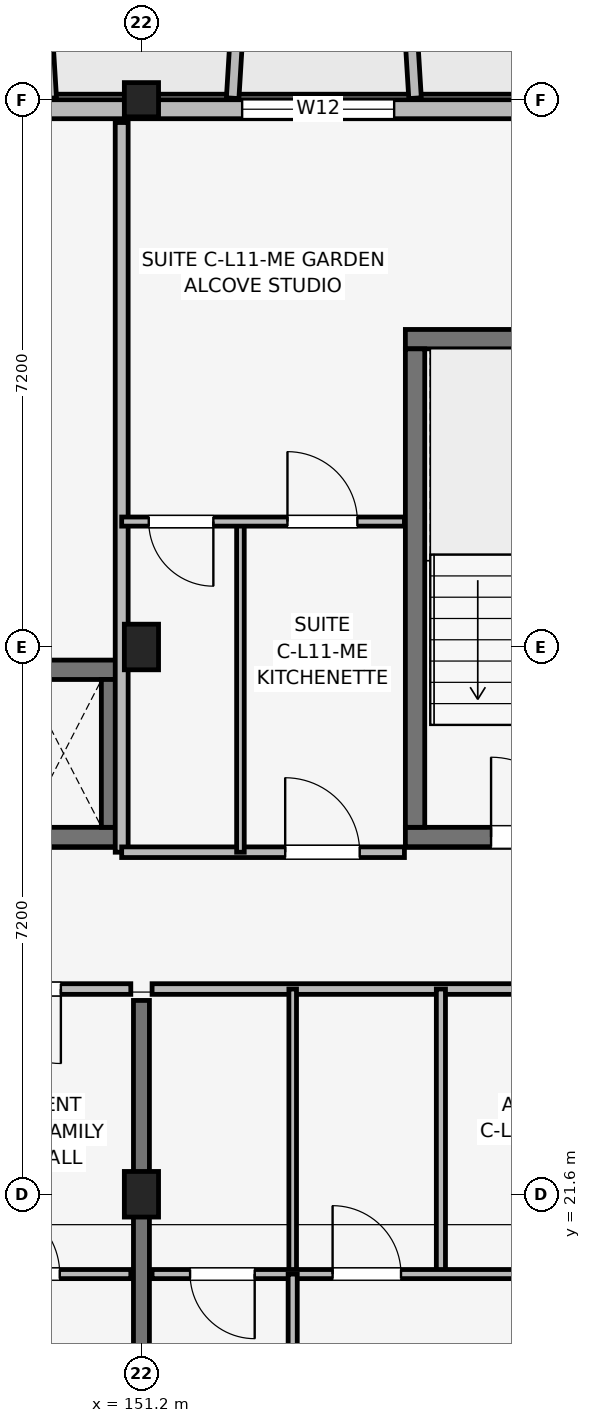
"""IFC4 building model, lengths in metres.
Left out: names, types, materials, properties, quantities, classifications, styles, units other than length and angle.
Written with IfcOpenShell. Run it as: python <this file> out.ifc"""

import sys

from ifc_helpers import new_model, si_unit, direction, frame, frame_2d, origin, origin_2d, place, context, subcontext, project, spatial, rectangle, extrude, element, fill, save


model = new_model("IFC4")
c1 = context("Model", 3, precision=1e-05, world=origin(), true_north=direction((0.0, 1.0)))
c2 = subcontext(c1, "Body", "Model", "MODEL_VIEW")
j1 = project(units=[si_unit("LENGTHUNIT", "METRE"), si_unit("PLANEANGLEUNIT", "RADIAN")], contexts=[c1])
p1 = place(None, origin())
s1 = spatial("IfcSite", under=j1, at=p1, CompositionType="ELEMENT")
p2 = place(p1, origin())
s2 = spatial("IfcBuilding", under=s1, at=p2, CompositionType="ELEMENT")
p3 = place(p2, frame((0.0, 0.0, 37.05)))
s3 = spatial("IfcBuildingStorey", under=s2, at=p3, CompositionType="ELEMENT", Elevation=37.05)
for number, where, z_axis, x_axis in (
    (1, (151.2, 21.6, 0.0), (0.0, 0.0, 1.0), (1.0, 0.0, 0.0)),
    (2, (151.2, 28.8, 0.0), (0.0, 0.0, 1.0), (1.0, 0.0, 0.0)),
):
    element("IfcColumn", number, at=place(p3, frame(where, z_axis=z_axis, x_axis=x_axis)), inside=s3, PredefinedType="COLUMN", context=c2, shape_type="SweptSolid", body=[
        extrude(rectangle(XDim=0.45, YDim=0.6, at=origin_2d()), origin(), (0.0, 0.0, 1.0), 3.15),
    ])
p4 = place(p3, frame((151.2, 36.0, 0.0), z_axis=(0.0, 0.0, 1.0), x_axis=(1.0, 0.0, 0.0)))
e3 = element("IfcColumn", 3, at=p4, inside=s3, PredefinedType="COLUMN", context=c2, shape_type="SweptSolid", body=[
    extrude(rectangle(XDim=0.45, YDim=0.45, at=origin_2d()), origin(), (0.0, 0.0, 1.0), 3.15),
])
p5 = place(p3, frame((154.673, 26.3, 0.0), z_axis=(0.0, 0.0, 1.0), x_axis=(1.0, 0.0, 0.0)))
e4 = element("IfcWall", 4, at=p5, inside=s3, PredefinedType="SHEAR", context=c2, shape_type="SweptSolid", body=[
    extrude(rectangle(XDim=3.305, YDim=0.255, at=frame_2d((1.652, 0.0))), origin(), (0.0, 0.0, 1.0), 3.15),
])
p6 = place(p5, frame((1.127, 0.0, 0.0)))
e5 = element("IfcOpeningElement", 5, at=p6, cuts=e4, PredefinedType="OPENING", context=c2, shape_type="SweptSolid", body=[
    extrude(rectangle(XDim=1.05, YDim=2.12, at=frame_2d((0.525, 1.06))), frame((0.0, 0.137, 0.0), z_axis=(0.0, -1.0, 0.0), x_axis=(1.0, 0.0, 0.0)), (0.0, 0.0, 1.0), 0.275),
])
p7 = place(p3, frame((154.673, 32.85, 0.0), z_axis=(0.0, 0.0, 1.0), x_axis=(1.0, 0.0, 0.0)))
e6 = element("IfcWall", 6, at=p7, inside=s3, PredefinedType="SHEAR", context=c2, shape_type="SweptSolid", body=[
    extrude(rectangle(XDim=3.305, YDim=0.255, at=frame_2d((1.652, 0.0))), origin(), (0.0, 0.0, 1.0), 3.15),
])
p8 = place(p3, frame((154.8, 26.427, 0.0), z_axis=(0.0, 0.0, 1.0), x_axis=(0.0, 1.0, 0.0)))
e7 = element("IfcWall", 7, at=p8, inside=s3, PredefinedType="SHEAR", context=c2, shape_type="SweptSolid", body=[
    extrude(rectangle(XDim=6.295, YDim=0.255, at=frame_2d((3.147, 0.0))), origin(), (0.0, 0.0, 1.0), 3.15),
])
for number, where, z_axis, x_axis in (
    (8, (149.123, 26.3, 0.0), (0.0, 0.0, 1.0), (1.0, 0.0, 0.0)),
    (9, (149.123, 28.5, 0.0), (0.0, 0.0, 1.0), (1.0, 0.0, 0.0)),
):
    element("IfcWall", number, at=place(p3, frame(where, z_axis=z_axis, x_axis=x_axis)), inside=s3, PredefinedType="SHEAR", context=c2, shape_type="SweptSolid", body=[
        extrude(rectangle(XDim=1.805, YDim=0.255, at=frame_2d((0.902, 0.0))), origin(), (0.0, 0.0, 1.0), 3.15),
    ])
p9 = place(p3, frame((150.8, 26.427, 0.0), z_axis=(0.0, 0.0, 1.0), x_axis=(0.0, 1.0, 0.0)))
e10 = element("IfcWall", 10, at=p9, inside=s3, PredefinedType="SHEAR", context=c2, shape_type="SweptSolid", body=[
    extrude(rectangle(XDim=1.945, YDim=0.255, at=frame_2d((0.973, 0.0))), origin(), (0.0, 0.0, 1.0), 3.15),
])
p10 = place(p3, frame((151.2, 14.75, 0.0), z_axis=(0.0, 0.0, 1.0), x_axis=(0.0, 1.0, 0.0)))
e11 = element("IfcWall", 11, at=p10, inside=s3, PredefinedType="SHEAR", context=c2, shape_type="SweptSolid", body=[
    extrude(rectangle(XDim=9.4, YDim=0.21, at=frame_2d((4.7, 0.0))), origin(), (0.0, 0.0, 1.0), 3.15),
])
p11 = place(p3, frame((162.6, 35.875, 0.0), z_axis=(0.0, 0.0, 1.0), x_axis=(-1.0, 0.0, 0.0)))
e12 = element("IfcWall", 12, at=p11, inside=s3, PredefinedType="SOLIDWALL", context=c2, shape_type="SweptSolid", body=[
    extrude(rectangle(XDim=30.0, YDim=0.25, at=frame_2d((15.0, 0.0))), origin(), (0.0, 0.0, 1.0), 2.45),
])
p12 = place(p11, frame((28.95, 0.0, 0.0), z_axis=(0.0, 0.0, 1.0), x_axis=(-1.0, 0.0, 0.0)))
e13 = element("IfcOpeningElement", 13, at=p12, cuts=e12, PredefinedType="OPENING", context=c2, shape_type="SweptSolid", body=[
    extrude(rectangle(XDim=1.5, YDim=2.15, at=frame_2d((0.75, 1.075))), frame((0.0, 0.135, 0.0), z_axis=(0.0, -1.0, 0.0), x_axis=(1.0, 0.0, 0.0)), (0.0, 0.0, 1.0), 0.27),
])
p13 = place(p11, frame((2.625, 0.0, 0.0), z_axis=(0.0, 0.0, 1.0), x_axis=(-1.0, 0.0, 0.0)))
e14 = element("IfcOpeningElement", 14, at=p13, cuts=e12, PredefinedType="OPENING", context=c2, shape_type="SweptSolid", body=[
    extrude(rectangle(XDim=1.65, YDim=2.15, at=frame_2d((0.825, 1.075))), frame((0.0, 0.135, 0.0), z_axis=(0.0, -1.0, 0.0), x_axis=(1.0, 0.0, 0.0)), (0.0, 0.0, 1.0), 0.27),
])
p14 = place(p11, frame((15.23, 0.0, 0.5)))
e15 = element("IfcOpeningElement", 15, at=p14, cuts=e12, PredefinedType="OPENING", context=c2, shape_type="SweptSolid", body=[
    extrude(rectangle(XDim=1.15, YDim=1.68, at=frame_2d((0.575, 0.84))), frame((0.0, 0.135, 0.0), z_axis=(0.0, -1.0, 0.0), x_axis=(1.0, 0.0, 0.0)), (0.0, 0.0, 1.0), 0.27),
])
p15 = place(p11, frame((8.075, 0.0, 0.69)))
e16 = element("IfcOpeningElement", 16, at=p15, cuts=e12, PredefinedType="OPENING", context=c2, shape_type="SweptSolid", body=[
    extrude(rectangle(XDim=2.0, YDim=1.65, at=frame_2d((1.0, 0.825))), frame((0.0, 0.135, 0.0), z_axis=(0.0, -1.0, 0.0), x_axis=(1.0, 0.0, 0.0)), (0.0, 0.0, 1.0), 0.27),
])
p16 = place(p11, frame((20.11, 0.0, 0.7)))
e17 = element("IfcOpeningElement", 17, at=p16, cuts=e12, PredefinedType="OPENING", context=c2, shape_type="SweptSolid", body=[
    extrude(rectangle(XDim=1.58, YDim=1.6, at=frame_2d((0.79, 0.8))), frame((0.0, 0.135, 0.0), z_axis=(0.0, -1.0, 0.0), x_axis=(1.0, 0.0, 0.0)), (0.0, 0.0, 1.0), 0.27),
])
p17 = place(p3, frame((150.0, 36.02, 0.0), z_axis=(0.0, 0.0, 1.0), x_axis=(-0.061170732449, 0.998127317276, 0.0)))
e18 = element("IfcWall", 18, at=p17, inside=s3, PredefinedType="ELEMENTEDWALL", context=c2, shape_type="SweptSolid", body=[
    extrude(rectangle(XDim=1.964, YDim=0.165, at=frame_2d((0.982, 0.0))), origin(), (0.0, 0.0, 1.0), 2.45),
])
for number, where, z_axis, x_axis in (
    (19, (152.4, 36.02, 0.0), (0.0, 0.0, 1.0), (0.061, 0.998, 0.0)),
    (20, (154.8, 36.02, 0.0), (0.0, 0.0, 1.0), (-0.061, 0.998, 0.0)),
):
    element("IfcWall", number, at=place(p3, frame(where, z_axis=z_axis, x_axis=x_axis)), inside=s3, PredefinedType="ELEMENTEDWALL", context=c2, shape_type="SweptSolid", body=[
        extrude(rectangle(XDim=1.964, YDim=0.165, at=frame_2d((0.982, 0.0))), origin(), (0.0, 0.0, 1.0), 2.53),
    ])
p18 = place(p3, frame((144.14, 24.3, 0.0), z_axis=(0.0, 0.0, 1.0), x_axis=(1.0, 0.0, 0.0)))
e21 = element("IfcWall", 21, at=p18, inside=s3, PredefinedType="PARTITIONING", context=c2, shape_type="SweptSolid", body=[
    extrude(rectangle(XDim=6.92, YDim=0.14, at=frame_2d((3.46, 0.0))), origin(), (0.0, 0.0, 1.0), 2.38),
])
p19 = place(p18, frame((6.0, 0.0, 0.0), z_axis=(0.0, 0.0, 1.0), x_axis=(-1.0, 0.0, 0.0)))
e22 = element("IfcOpeningElement", 22, at=p19, cuts=e21, PredefinedType="OPENING", context=c2, shape_type="SweptSolid", body=[
    extrude(rectangle(XDim=0.98, YDim=2.1, at=frame_2d((0.49, 1.05))), frame((0.0, 0.08, 0.0), z_axis=(0.0, -1.0, 0.0), x_axis=(1.0, 0.0, 0.0)), (0.0, 0.0, 1.0), 0.16),
])
p20 = place(p3, frame((144.14, 20.55, 0.0), z_axis=(0.0, 0.0, 1.0), x_axis=(1.0, 0.0, 0.0)))
e23 = element("IfcWall", 23, at=p20, inside=s3, PredefinedType="PARTITIONING", context=c2, shape_type="SweptSolid", body=[
    extrude(rectangle(XDim=6.92, YDim=0.12, at=frame_2d((3.46, 0.0))), origin(), (0.0, 0.0, 1.0), 2.38),
])
p21 = place(p20, frame((0.5, 0.0, 0.0)))
e24 = element("IfcOpeningElement", 24, at=p21, cuts=e23, PredefinedType="OPENING", context=c2, shape_type="SweptSolid", body=[
    extrude(rectangle(XDim=0.85, YDim=2.08, at=frame_2d((0.425, 1.04))), frame((0.0, 0.07, 0.0), z_axis=(0.0, -1.0, 0.0), x_axis=(1.0, 0.0, 0.0)), (0.0, 0.0, 1.0), 0.14),
])
p22 = place(p20, frame((3.425, 0.0, 0.0), z_axis=(0.0, 0.0, 1.0), x_axis=(-1.0, 0.0, 0.0)))
e25 = element("IfcOpeningElement", 25, at=p22, cuts=e23, PredefinedType="OPENING", context=c2, shape_type="SweptSolid", body=[
    extrude(rectangle(XDim=0.9, YDim=2.08, at=frame_2d((0.45, 1.04))), frame((0.0, 0.07, 0.0), z_axis=(0.0, -1.0, 0.0), x_axis=(1.0, 0.0, 0.0)), (0.0, 0.0, 1.0), 0.14),
])
p23 = place(p20, frame((5.035, 0.0, 0.0)))
e26 = element("IfcOpeningElement", 26, at=p23, cuts=e23, PredefinedType="OPENING", context=c2, shape_type="SweptSolid", body=[
    extrude(rectangle(XDim=0.95, YDim=2.08, at=frame_2d((0.475, 1.04))), frame((0.0, 0.07, 0.0), z_axis=(0.0, -1.0, 0.0), x_axis=(1.0, 0.0, 0.0)), (0.0, 0.0, 1.0), 0.14),
])
p24 = place(p3, frame((151.34, 24.3, 0.0), z_axis=(0.0, 0.0, 1.0), x_axis=(1.0, 0.0, 0.0)))
e27 = element("IfcWall", 27, at=p24, inside=s3, PredefinedType="PARTITIONING", context=c2, shape_type="SweptSolid", body=[
    extrude(rectangle(XDim=6.92, YDim=0.14, at=frame_2d((3.46, 0.0))), origin(), (0.0, 0.0, 1.0), 2.38),
])
p25 = place(p24, frame((4.87, 0.0, 0.0)))
e28 = element("IfcOpeningElement", 28, at=p25, cuts=e27, PredefinedType="OPENING", context=c2, shape_type="SweptSolid", body=[
    extrude(rectangle(XDim=0.98, YDim=2.1, at=frame_2d((0.49, 1.05))), frame((0.0, 0.08, 0.0), z_axis=(0.0, -1.0, 0.0), x_axis=(1.0, 0.0, 0.0)), (0.0, 0.0, 1.0), 0.16),
])
p26 = place(p3, frame((153.19, 20.55, 0.0), z_axis=(0.0, 0.0, 1.0), x_axis=(0.0, 1.0, 0.0)))
e29 = element("IfcWall", 29, at=p26, inside=s3, PredefinedType="PARTITIONING", context=c2, shape_type="SweptSolid", body=[
    extrude(rectangle(XDim=3.75, YDim=0.1, at=frame_2d((1.875, 0.0))), origin(), (0.0, 0.0, 1.0), 2.38),
])
p27 = place(p3, frame((155.14, 20.55, 0.0), z_axis=(0.0, 0.0, 1.0), x_axis=(0.0, 1.0, 0.0)))
e30 = element("IfcWall", 30, at=p27, inside=s3, PredefinedType="PARTITIONING", context=c2, shape_type="SweptSolid", body=[
    extrude(rectangle(XDim=3.75, YDim=0.12, at=frame_2d((1.875, 0.0))), origin(), (0.0, 0.0, 1.0), 2.38),
])
p28 = place(p3, frame((151.34, 20.55, 0.0), z_axis=(0.0, 0.0, 1.0), x_axis=(1.0, 0.0, 0.0)))
e31 = element("IfcWall", 31, at=p28, inside=s3, PredefinedType="PARTITIONING", context=c2, shape_type="SweptSolid", body=[
    extrude(rectangle(XDim=6.92, YDim=0.12, at=frame_2d((3.46, 0.0))), origin(), (0.0, 0.0, 1.0), 2.38),
])
p29 = place(p28, frame((1.35, 0.0, 0.0), z_axis=(0.0, 0.0, 1.0), x_axis=(-1.0, 0.0, 0.0)))
e32 = element("IfcOpeningElement", 32, at=p29, cuts=e31, PredefinedType="OPENING", context=c2, shape_type="SweptSolid", body=[
    extrude(rectangle(XDim=0.85, YDim=2.08, at=frame_2d((0.425, 1.04))), frame((0.0, 0.07, 0.0), z_axis=(0.0, -1.0, 0.0), x_axis=(1.0, 0.0, 0.0)), (0.0, 0.0, 1.0), 0.14),
])
p30 = place(p28, frame((2.375, 0.0, 0.0)))
e33 = element("IfcOpeningElement", 33, at=p30, cuts=e31, PredefinedType="OPENING", context=c2, shape_type="SweptSolid", body=[
    extrude(rectangle(XDim=0.9, YDim=2.08, at=frame_2d((0.45, 1.04))), frame((0.0, 0.07, 0.0), z_axis=(0.0, -1.0, 0.0), x_axis=(1.0, 0.0, 0.0)), (0.0, 0.0, 1.0), 0.14),
])
p31 = place(p28, frame((5.835, 0.0, 0.0), z_axis=(0.0, 0.0, 1.0), x_axis=(-1.0, 0.0, 0.0)))
e34 = element("IfcOpeningElement", 34, at=p31, cuts=e31, PredefinedType="OPENING", context=c2, shape_type="SweptSolid", body=[
    extrude(rectangle(XDim=0.95, YDim=2.08, at=frame_2d((0.475, 1.04))), frame((0.0, 0.07, 0.0), z_axis=(0.0, -1.0, 0.0), x_axis=(1.0, 0.0, 0.0)), (0.0, 0.0, 1.0), 0.14),
])
p32 = place(p3, frame((153.19, 14.7, 0.0), z_axis=(0.0, 0.0, 1.0), x_axis=(0.0, 1.0, 0.0)))
e35 = element("IfcWall", 35, at=p32, inside=s3, PredefinedType="PARTITIONING", context=c2, shape_type="SweptSolid", body=[
    extrude(rectangle(XDim=5.85, YDim=0.12, at=frame_2d((2.925, 0.0))), origin(), (0.0, 0.0, 1.0), 2.38),
])
p33 = place(p32, frame((2.475, 0.0, 0.0)))
e36 = element("IfcOpeningElement", 36, at=p33, cuts=e35, PredefinedType="OPENING", context=c2, shape_type="SweptSolid", body=[
    extrude(rectangle(XDim=0.9, YDim=2.08, at=frame_2d((0.45, 1.04))), frame((0.0, 0.07, 0.0), z_axis=(0.0, -1.0, 0.0), x_axis=(1.0, 0.0, 0.0)), (0.0, 0.0, 1.0), 0.14),
])
p34 = place(p3, frame((150.94, 26.1, 0.0), z_axis=(0.0, 0.0, 1.0), x_axis=(0.0, 1.0, 0.0)))
e37 = element("IfcWall", 37, at=p34, inside=s3, PredefinedType="PARTITIONING", context=c2, shape_type="SweptSolid", body=[
    extrude(rectangle(XDim=9.6, YDim=0.17, at=frame_2d((4.8, 0.0))), origin(), (0.0, 0.0, 1.0), 2.38),
])
p35 = place(p3, frame((150.94, 26.1, 0.0), z_axis=(0.0, 0.0, 1.0), x_axis=(1.0, 0.0, 0.0)))
e38 = element("IfcWall", 38, at=p35, inside=s3, PredefinedType="PARTITIONING", context=c2, shape_type="SweptSolid", body=[
    extrude(rectangle(XDim=3.72, YDim=0.14, at=frame_2d((1.86, 0.0))), origin(), (0.0, 0.0, 1.0), 2.38),
])
p36 = place(p35, frame((2.151, 0.0, 0.0)))
e39 = element("IfcOpeningElement", 39, at=p36, cuts=e38, PredefinedType="OPENING", context=c2, shape_type="SweptSolid", body=[
    extrude(rectangle(XDim=0.98, YDim=2.1, at=frame_2d((0.49, 1.05))), frame((0.0, 0.08, 0.0), z_axis=(0.0, -1.0, 0.0), x_axis=(1.0, 0.0, 0.0)), (0.0, 0.0, 1.0), 0.16),
])
p37 = place(p3, frame((152.502, 26.1, 0.0), z_axis=(0.0, 0.0, 1.0), x_axis=(0.0, 1.0, 0.0)))
e40 = element("IfcWall", 40, at=p37, inside=s3, PredefinedType="PARTITIONING", context=c2, shape_type="SweptSolid", body=[
    extrude(rectangle(XDim=4.35, YDim=0.1, at=frame_2d((2.175, 0.0))), origin(), (0.0, 0.0, 1.0), 2.38),
])
p38 = place(p3, frame((150.94, 30.45, 0.0), z_axis=(0.0, 0.0, 1.0), x_axis=(1.0, 0.0, 0.0)))
e41 = element("IfcWall", 41, at=p38, inside=s3, PredefinedType="PARTITIONING", context=c2, shape_type="SweptSolid", body=[
    extrude(rectangle(XDim=3.72, YDim=0.12, at=frame_2d((1.86, 0.0))), origin(), (0.0, 0.0, 1.0), 2.38),
])
p39 = place(p38, frame((1.206, 0.0, 0.0), z_axis=(0.0, 0.0, 1.0), x_axis=(-1.0, 0.0, 0.0)))
e42 = element("IfcOpeningElement", 42, at=p39, cuts=e41, PredefinedType="OPENING", context=c2, shape_type="SweptSolid", body=[
    extrude(rectangle(XDim=0.85, YDim=2.08, at=frame_2d((0.425, 1.04))), frame((0.0, 0.07, 0.0), z_axis=(0.0, -1.0, 0.0), x_axis=(1.0, 0.0, 0.0)), (0.0, 0.0, 1.0), 0.14),
])
p40 = place(p38, frame((2.181, 0.0, 0.0)))
e43 = element("IfcOpeningElement", 43, at=p40, cuts=e41, PredefinedType="OPENING", context=c2, shape_type="SweptSolid", body=[
    extrude(rectangle(XDim=0.92, YDim=2.08, at=frame_2d((0.46, 1.04))), frame((0.0, 0.07, 0.0), z_axis=(0.0, -1.0, 0.0), x_axis=(1.0, 0.0, 0.0)), (0.0, 0.0, 1.0), 0.14),
])
p41 = place(p15, origin())
e44 = element("IfcWindow", 44, at=p41, inside=s3, PartitioningType="SINGLE_PANEL", PredefinedType="WINDOW", context=c2, shape_type="SweptSolid", body=[
    extrude(rectangle(XDim=2.0, YDim=1.65, at=frame_2d((1.0, 0.825))), frame((0.0, 0.03, 0.0), z_axis=(0.0, -1.0, 0.0), x_axis=(1.0, 0.0, 0.0)), (0.0, 0.0, 1.0), 0.06),
])
fill(e16, e44)
p42 = place(p19, origin())
e45 = element("IfcDoor", 45, at=p42, inside=s3, OperationType="SINGLE_SWING_RIGHT", PredefinedType="DOOR", context=c2, shape_type="SweptSolid", body=[
    extrude(rectangle(XDim=0.98, YDim=2.1, at=frame_2d((0.49, 1.05))), frame((0.0, 0.025, 0.0), z_axis=(0.0, -1.0, 0.0), x_axis=(1.0, 0.0, 0.0)), (0.0, 0.0, 1.0), 0.05),
])
fill(e22, e45)
p43 = place(p23, origin())
e46 = element("IfcDoor", 46, at=p43, inside=s3, OperationType="SINGLE_SWING_LEFT", PredefinedType="DOOR", context=c2, shape_type="SweptSolid", body=[
    extrude(rectangle(XDim=0.95, YDim=2.08, at=frame_2d((0.475, 1.04))), frame((0.0, 0.025, 0.0), z_axis=(0.0, -1.0, 0.0), x_axis=(1.0, 0.0, 0.0)), (0.0, 0.0, 1.0), 0.05),
])
fill(e26, e46)
p44 = place(p29, origin())
e47 = element("IfcDoor", 47, at=p44, inside=s3, OperationType="SINGLE_SWING_RIGHT", PredefinedType="DOOR", context=c2, shape_type="SweptSolid", body=[
    extrude(rectangle(XDim=0.85, YDim=2.08, at=frame_2d((0.425, 1.04))), frame((0.0, 0.025, 0.0), z_axis=(0.0, -1.0, 0.0), x_axis=(1.0, 0.0, 0.0)), (0.0, 0.0, 1.0), 0.05),
])
fill(e32, e47)
p45 = place(p30, origin())
e48 = element("IfcDoor", 48, at=p45, inside=s3, OperationType="SINGLE_SWING_LEFT", PredefinedType="DOOR", context=c2, shape_type="SweptSolid", body=[
    extrude(rectangle(XDim=0.9, YDim=2.08, at=frame_2d((0.45, 1.04))), frame((0.0, 0.025, 0.0), z_axis=(0.0, -1.0, 0.0), x_axis=(1.0, 0.0, 0.0)), (0.0, 0.0, 1.0), 0.05),
])
fill(e33, e48)
p46 = place(p36, origin())
e49 = element("IfcDoor", 49, at=p46, inside=s3, OperationType="SINGLE_SWING_LEFT", PredefinedType="DOOR", context=c2, shape_type="SweptSolid", body=[
    extrude(rectangle(XDim=0.98, YDim=2.1, at=frame_2d((0.49, 1.05))), frame((0.0, 0.025, 0.0), z_axis=(0.0, -1.0, 0.0), x_axis=(1.0, 0.0, 0.0)), (0.0, 0.0, 1.0), 0.05),
])
fill(e39, e49)
p47 = place(p39, origin())
e50 = element("IfcDoor", 50, at=p47, inside=s3, OperationType="SINGLE_SWING_RIGHT", PredefinedType="DOOR", context=c2, shape_type="SweptSolid", body=[
    extrude(rectangle(XDim=0.85, YDim=2.08, at=frame_2d((0.425, 1.04))), frame((0.0, 0.025, 0.0), z_axis=(0.0, -1.0, 0.0), x_axis=(1.0, 0.0, 0.0)), (0.0, 0.0, 1.0), 0.05),
])
fill(e42, e50)
p48 = place(p40, origin())
e51 = element("IfcDoor", 51, at=p48, inside=s3, OperationType="SINGLE_SWING_LEFT", PredefinedType="DOOR", context=c2, shape_type="SweptSolid", body=[
    extrude(rectangle(XDim=0.92, YDim=2.08, at=frame_2d((0.46, 1.04))), frame((0.0, 0.025, 0.0), z_axis=(0.0, -1.0, 0.0), x_axis=(1.0, 0.0, 0.0)), (0.0, 0.0, 1.0), 0.05),
])
fill(e43, e51)
p49 = place(p6, origin())
e52 = element("IfcDoor", 52, at=p49, inside=s3, OperationType="SINGLE_SWING_LEFT", PredefinedType="DOOR", context=c2, shape_type="SweptSolid", body=[
    extrude(rectangle(XDim=1.05, YDim=2.12, at=frame_2d((0.525, 1.06))), frame((0.0, 0.025, 0.0), z_axis=(0.0, -1.0, 0.0), x_axis=(1.0, 0.0, 0.0)), (0.0, 0.0, 1.0), 0.05),
])
fill(e5, e52)
save(model, sys.argv[1])
